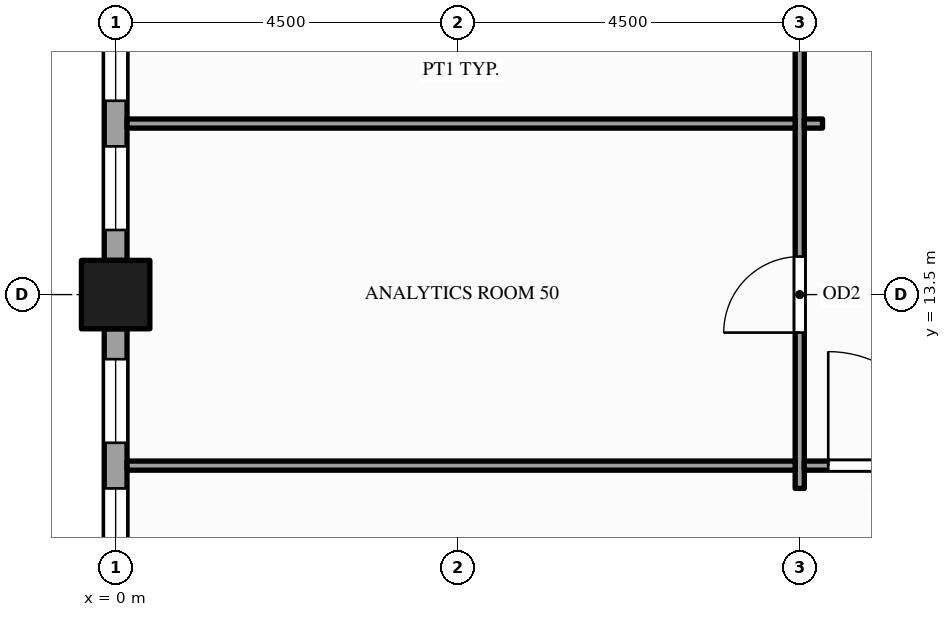
"""IFC4 building model, lengths in metres.
Left out: names, types, materials, properties, quantities, classifications, styles, units other than length and angle.
Written with IfcOpenShell. Run it as: python <this file> out.ifc"""

import sys

from ifc_helpers import new_model, si_unit, direction, frame, frame_2d, origin, origin_2d, place, context, subcontext, project, spatial, rectangle, hollow_rectangle, extrude, element, fill, save


model = new_model("IFC4")
c1 = context("Model", 3, precision=1e-05, world=origin(), true_north=direction((0.0, 1.0)))
c2 = subcontext(c1, "Body", "Model", "MODEL_VIEW")
j1 = project(units=[si_unit("LENGTHUNIT", "METRE"), si_unit("PLANEANGLEUNIT", "RADIAN")], contexts=[c1])
p1 = place(None, origin())
s1 = spatial("IfcSite", under=j1, at=p1, CompositionType="ELEMENT")
p2 = place(p1, origin())
s2 = spatial("IfcBuilding", under=s1, at=p2, CompositionType="ELEMENT")
p3 = place(p2, frame((0.0, 0.0, 147.0)))
s3 = spatial("IfcBuildingStorey", under=s2, at=p3, CompositionType="ELEMENT", Elevation=147.0)
p4 = place(p3, frame((0.0, 13.5, -0.15), z_axis=(0.0, 0.0, 1.0), x_axis=(1.0, 0.0, 0.0)))
e1 = element("IfcColumn", 1, at=p4, inside=s3, PredefinedType="COLUMN", context=c2, shape_type="SweptSolid", body=[
    extrude(hollow_rectangle(XDim=0.9, YDim=0.9, WallThickness=0.045, at=origin_2d()), origin(), (0.0, 0.0, 1.0), 4.0),
])
p5 = place(p3, frame((0.0, 17.55, 0.0), z_axis=(0.0, 0.0, 1.0), x_axis=(0.0, -1.0, 0.0)))
e2 = element("IfcWall", 2, at=p5, inside=s3, PredefinedType="STANDARD", context=c2, shape_type="SweptSolid", body=[
    extrude(rectangle(XDim=3.6, YDim=0.3, at=frame_2d((1.8, 0.0))), origin(), (0.0, 0.0, 1.0), 3.149),
])
p6 = place(p5, frame((0.4, 0.0, 0.9)))
e3 = element("IfcOpeningElement", 3, at=p6, cuts=e2, PredefinedType="OPENING", context=c2, shape_type="SweptSolid", body=[
    extrude(rectangle(XDim=1.1, YDim=2.0, at=frame_2d((0.55, 1.0))), frame((0.0, 0.16, 0.0), z_axis=(0.0, -1.0, 0.0), x_axis=(1.0, 0.0, 0.0)), (0.0, 0.0, 1.0), 0.32),
])
p7 = place(p5, frame((2.1, 0.0, 0.9)))
e4 = element("IfcOpeningElement", 4, at=p7, cuts=e2, PredefinedType="OPENING", context=c2, shape_type="SweptSolid", body=[
    extrude(rectangle(XDim=1.1, YDim=2.0, at=frame_2d((0.55, 1.0))), frame((0.0, 0.16, 0.0), z_axis=(0.0, -1.0, 0.0), x_axis=(1.0, 0.0, 0.0)), (0.0, 0.0, 1.0), 0.32),
])
p8 = place(p3, frame((0.0, 13.05, 0.0), z_axis=(0.0, 0.0, 1.0), x_axis=(0.0, -1.0, 0.0)))
e5 = element("IfcWall", 5, at=p8, inside=s3, PredefinedType="STANDARD", context=c2, shape_type="SweptSolid", body=[
    extrude(rectangle(XDim=3.6, YDim=0.3, at=frame_2d((1.8, 0.0))), origin(), (0.0, 0.0, 1.0), 3.149),
])
p9 = place(p8, frame((0.4, 0.0, 0.9)))
e6 = element("IfcOpeningElement", 6, at=p9, cuts=e5, PredefinedType="OPENING", context=c2, shape_type="SweptSolid", body=[
    extrude(rectangle(XDim=1.1, YDim=2.0, at=frame_2d((0.55, 1.0))), frame((0.0, 0.16, 0.0), z_axis=(0.0, -1.0, 0.0), x_axis=(1.0, 0.0, 0.0)), (0.0, 0.0, 1.0), 0.32),
])
p10 = place(p8, frame((2.1, 0.0, 0.9)))
e7 = element("IfcOpeningElement", 7, at=p10, cuts=e5, PredefinedType="OPENING", context=c2, shape_type="SweptSolid", body=[
    extrude(rectangle(XDim=1.1, YDim=2.0, at=frame_2d((0.55, 1.0))), frame((0.0, 0.16, 0.0), z_axis=(0.0, -1.0, 0.0), x_axis=(1.0, 0.0, 0.0)), (0.0, 0.0, 1.0), 0.32),
])
p11 = place(p3, frame((9.0, 10.95, 0.0), z_axis=(0.0, 0.0, 1.0), x_axis=(0.0, 1.0, 0.0)))
e8 = element("IfcWall", 8, at=p11, inside=s3, PredefinedType="PARTITIONING", context=c2, shape_type="SweptSolid", body=[
    extrude(rectangle(XDim=20.85, YDim=0.12, at=frame_2d((10.425, 0.0))), origin(), (0.0, 0.0, 1.0), 2.6),
])
p12 = place(p11, frame((2.05, 0.0, 0.0)))
e9 = element("IfcOpeningElement", 9, at=p12, cuts=e8, PredefinedType="OPENING", context=c2, shape_type="SweptSolid", body=[
    extrude(rectangle(XDim=1.0, YDim=2.1, at=frame_2d((0.5, 1.05))), frame((0.0, 0.07, 0.0), z_axis=(0.0, -1.0, 0.0), x_axis=(1.0, 0.0, 0.0)), (0.0, 0.0, 1.0), 0.14),
])
p13 = place(p11, frame((6.55, 0.0, 0.0)))
e10 = element("IfcOpeningElement", 10, at=p13, cuts=e8, PredefinedType="OPENING", context=c2, shape_type="SweptSolid", body=[
    extrude(rectangle(XDim=1.0, YDim=2.1, at=frame_2d((0.5, 1.05))), frame((0.0, 0.07, 0.0), z_axis=(0.0, -1.0, 0.0), x_axis=(1.0, 0.0, 0.0)), (0.0, 0.0, 1.0), 0.14),
])
p14 = place(p11, frame((11.805, 0.0, 0.0)))
e11 = element("IfcOpeningElement", 11, at=p14, cuts=e8, PredefinedType="OPENING", context=c2, shape_type="SweptSolid", body=[
    extrude(rectangle(XDim=1.8, YDim=2.1, at=frame_2d((0.9, 1.05))), frame((0.0, 0.07, 0.0), z_axis=(0.0, -1.0, 0.0), x_axis=(1.0, 0.0, 0.0)), (0.0, 0.0, 1.0), 0.14),
])
p15 = place(p3, frame((0.15, 11.25, 0.0), z_axis=(0.0, 0.0, 1.0), x_axis=(1.0, 0.0, 0.0)))
e12 = element("IfcWall", 12, at=p15, inside=s3, PredefinedType="PARTITIONING", context=c2, shape_type="SweptSolid", body=[
    extrude(rectangle(XDim=8.79, YDim=0.12, at=frame_2d((4.395, 0.0))), origin(), (0.0, 0.0, 1.0), 2.87),
])
p16 = place(p3, frame((9.06, 11.25, 0.0), z_axis=(0.0, 0.0, 1.0), x_axis=(1.0, 0.0, 0.0)))
e13 = element("IfcWall", 13, at=p16, inside=s3, PredefinedType="PARTITIONING", context=c2, shape_type="SweptSolid", body=[
    extrude(rectangle(XDim=2.13, YDim=0.12, at=frame_2d((1.065, 0.0))), origin(), (0.0, 0.0, 1.0), 2.87),
])
p17 = place(p16, frame((0.315, 0.0, 0.0)))
e14 = element("IfcOpeningElement", 14, at=p17, cuts=e13, PredefinedType="OPENING", context=c2, shape_type="SweptSolid", body=[
    extrude(rectangle(XDim=1.5, YDim=2.1, at=frame_2d((0.75, 1.05))), frame((0.0, 0.07, 0.0), z_axis=(0.0, -1.0, 0.0), x_axis=(1.0, 0.0, 0.0)), (0.0, 0.0, 1.0), 0.14),
])
p18 = place(p3, frame((0.15, 15.75, 0.0), z_axis=(0.0, 0.0, 1.0), x_axis=(1.0, 0.0, 0.0)))
e15 = element("IfcWall", 15, at=p18, inside=s3, PredefinedType="PARTITIONING", context=c2, shape_type="SweptSolid", body=[
    extrude(rectangle(XDim=8.79, YDim=0.12, at=frame_2d((4.395, 0.0))), origin(), (0.0, 0.0, 1.0), 2.87),
])
p19 = place(p3, frame((9.06, 15.75, 0.0), z_axis=(0.0, 0.0, 1.0), x_axis=(1.0, 0.0, 0.0)))
e16 = element("IfcWall", 16, at=p19, inside=s3, PredefinedType="PARTITIONING", context=c2, shape_type="SweptSolid", body=[
    extrude(rectangle(XDim=0.24, YDim=0.12, at=frame_2d((0.12, 0.0))), origin(), (0.0, 0.0, 1.0), 2.87),
])
p20 = place(p6, origin())
e17 = element("IfcWindow", 17, at=p20, inside=s3, PartitioningType="SINGLE_PANEL", PredefinedType="WINDOW", context=c2, shape_type="SweptSolid", body=[
    extrude(rectangle(XDim=1.1, YDim=2.0, at=frame_2d((0.55, 1.0))), frame((0.0, 0.03, 0.0), z_axis=(0.0, -1.0, 0.0), x_axis=(1.0, 0.0, 0.0)), (0.0, 0.0, 1.0), 0.06),
])
fill(e3, e17)
p21 = place(p7, origin())
e18 = element("IfcWindow", 18, at=p21, inside=s3, PartitioningType="SINGLE_PANEL", PredefinedType="WINDOW", context=c2, shape_type="SweptSolid", body=[
    extrude(rectangle(XDim=1.1, YDim=2.0, at=frame_2d((0.55, 1.0))), frame((0.0, 0.03, 0.0), z_axis=(0.0, -1.0, 0.0), x_axis=(1.0, 0.0, 0.0)), (0.0, 0.0, 1.0), 0.06),
])
fill(e4, e18)
p22 = place(p9, origin())
e19 = element("IfcWindow", 19, at=p22, inside=s3, PartitioningType="SINGLE_PANEL", PredefinedType="WINDOW", context=c2, shape_type="SweptSolid", body=[
    extrude(rectangle(XDim=1.1, YDim=2.0, at=frame_2d((0.55, 1.0))), frame((0.0, 0.03, 0.0), z_axis=(0.0, -1.0, 0.0), x_axis=(1.0, 0.0, 0.0)), (0.0, 0.0, 1.0), 0.06),
])
fill(e6, e19)
p23 = place(p10, origin())
e20 = element("IfcWindow", 20, at=p23, inside=s3, PartitioningType="SINGLE_PANEL", PredefinedType="WINDOW", context=c2, shape_type="SweptSolid", body=[
    extrude(rectangle(XDim=1.1, YDim=2.0, at=frame_2d((0.55, 1.0))), frame((0.0, 0.03, 0.0), z_axis=(0.0, -1.0, 0.0), x_axis=(1.0, 0.0, 0.0)), (0.0, 0.0, 1.0), 0.06),
])
fill(e7, e20)
p24 = place(p17, origin())
e21 = element("IfcDoor", 21, at=p24, inside=s3, OperationType="SINGLE_SWING_LEFT", PredefinedType="DOOR", context=c2, shape_type="SweptSolid", body=[
    extrude(rectangle(XDim=1.5, YDim=2.1, at=frame_2d((0.75, 1.05))), frame((0.0, 0.025, 0.0), z_axis=(0.0, -1.0, 0.0), x_axis=(1.0, 0.0, 0.0)), (0.0, 0.0, 1.0), 0.05),
])
fill(e14, e21)
p25 = place(p12, origin())
e22 = element("IfcDoor", 22, at=p25, inside=s3, OperationType="SINGLE_SWING_LEFT", PredefinedType="DOOR", context=c2, shape_type="SweptSolid", body=[
    extrude(rectangle(XDim=1.0, YDim=2.1, at=frame_2d((0.5, 1.05))), frame((0.0, 0.025, 0.0), z_axis=(0.0, -1.0, 0.0), x_axis=(1.0, 0.0, 0.0)), (0.0, 0.0, 1.0), 0.05),
])
fill(e9, e22)
save(model, sys.argv[1])
